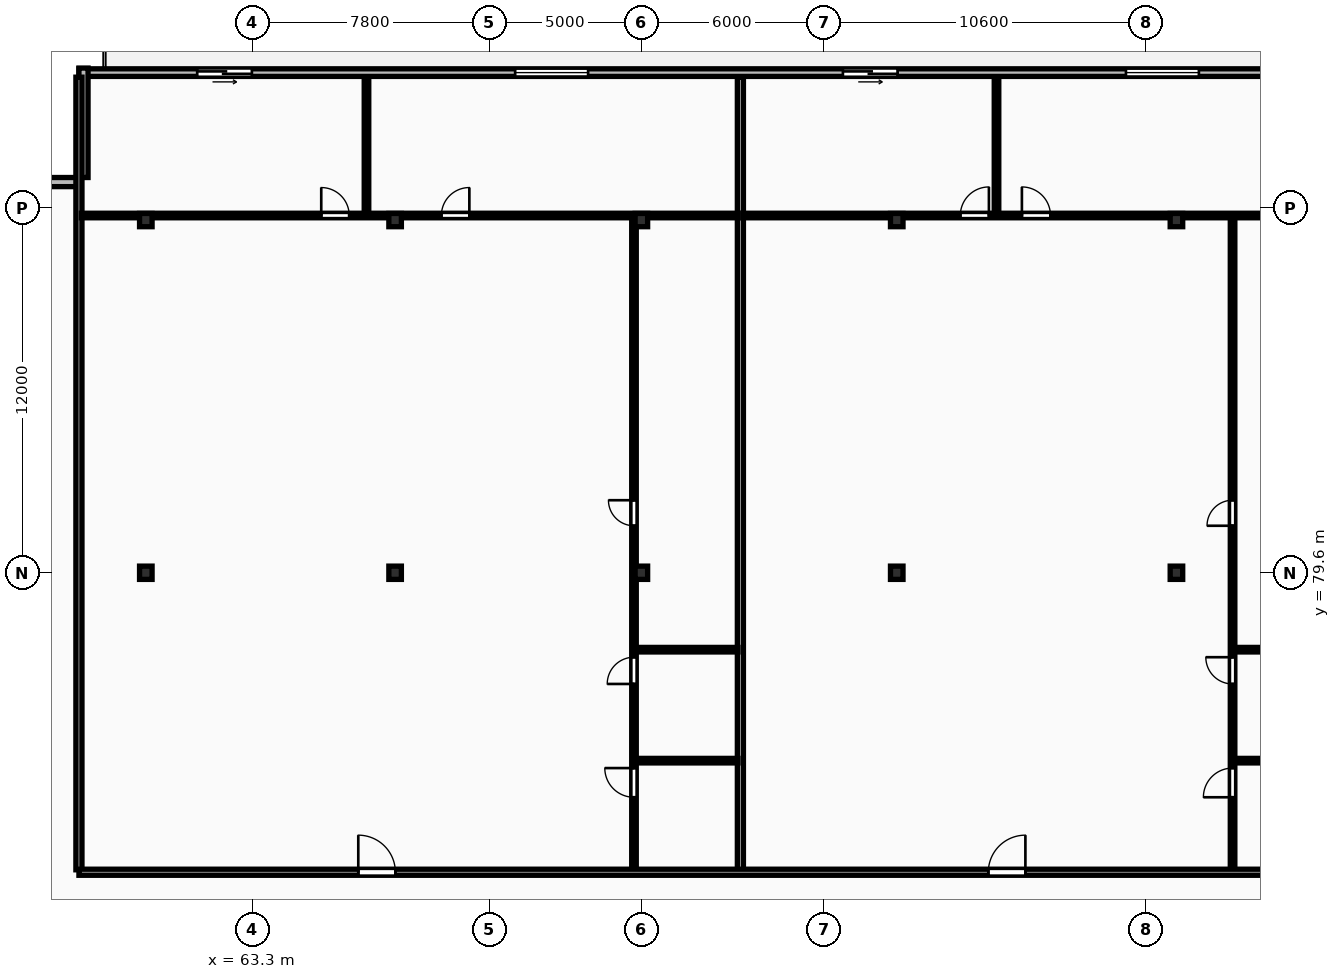
"""IFC4 building model, lengths in metres.
Left out: names, types, materials, properties, quantities, classifications, styles, units other than length and angle.
Written with IfcOpenShell. Run it as: python <this file> out.ifc"""

import sys

from ifc_helpers import new_model, si_unit, direction, frame, frame_2d, origin, origin_2d, place, context, subcontext, project, spatial, rectangle, i_section, extrude, element, fill, save


model = new_model("IFC4")
c1 = context("Model", 3, precision=1e-05, world=origin(), true_north=direction((0.0, 1.0)))
c2 = subcontext(c1, "Body", "Model", "MODEL_VIEW")
j1 = project(units=[si_unit("LENGTHUNIT", "METRE"), si_unit("PLANEANGLEUNIT", "RADIAN")], contexts=[c1])
p1 = place(None, origin())
s1 = spatial("IfcSite", under=j1, at=p1, CompositionType="ELEMENT")
p2 = place(p1, origin())
s2 = spatial("IfcBuilding", under=s1, at=p2, CompositionType="ELEMENT")
p3 = place(p2, frame((0.0, 0.0, 150.1)))
s3 = spatial("IfcBuildingStorey", under=s2, at=p3, CompositionType="ELEMENT", Elevation=150.1)
for number, where, z_axis, x_axis in (
    (1, (59.8, 79.6, 0.0), (0.0, 0.0, 1.0), (1.0, 0.0, 0.0)),
    (2, (59.8, 91.2, 0.0), (0.0, 0.0, 1.0), (1.0, 0.0, 0.0)),
    (3, (68.0, 79.6, 0.0), (0.0, 0.0, 1.0), (1.0, 0.0, 0.0)),
    (4, (68.0, 91.2, 0.0), (0.0, 0.0, 1.0), (1.0, 0.0, 0.0)),
    (5, (76.1, 79.6, 0.0), (0.0, 0.0, 1.0), (1.0, 0.0, 0.0)),
    (6, (76.1, 91.2, 0.0), (0.0, 0.0, 1.0), (1.0, 0.0, 0.0)),
    (7, (84.5, 79.6, 0.0), (0.0, 0.0, 1.0), (1.0, 0.0, 0.0)),
    (8, (84.5, 91.2, 0.0), (0.0, 0.0, 1.0), (1.0, 0.0, 0.0)),
    (9, (93.7, 79.6, 0.0), (0.0, 0.0, 1.0), (1.0, 0.0, 0.0)),
    (10, (93.7, 91.2, 0.0), (0.0, 0.0, 1.0), (1.0, 0.0, 0.0)),
):
    element("IfcColumn", number, at=place(p3, frame(where, z_axis=z_axis, x_axis=x_axis)), inside=s3, PredefinedType="COLUMN", context=c2, shape_type="SweptSolid", body=[
        extrude(i_section(OverallWidth=0.412, OverallDepth=0.437, WebThickness=0.036, FlangeThickness=0.052, FilletRadius=0.015, at=origin_2d()), origin(), (0.0, 0.0, 1.0), 3.6),
    ])
p4 = place(p3, frame((130.6, 96.05, 0.0), z_axis=(0.0, 0.0, 1.0), x_axis=(-1.0, 0.0, 0.0)))
e11 = element("IfcWall", 11, at=p4, inside=s3, PredefinedType="STANDARD", context=c2, shape_type="SweptSolid", body=[
    extrude(rectangle(XDim=73.0, YDim=0.25, at=frame_2d((36.5, 0.0))), origin(), (0.0, 0.0, 1.0), 3.31),
])
p5 = place(p4, frame((67.311, 0.0, 0.0)))
e12 = element("IfcOpeningElement", 12, at=p5, cuts=e11, PredefinedType="OPENING", context=c2, shape_type="SweptSolid", body=[
    extrude(rectangle(XDim=1.8, YDim=2.2, at=frame_2d((0.9, 1.1))), frame((0.0, 0.135, 0.0), z_axis=(0.0, -1.0, 0.0), x_axis=(1.0, 0.0, 0.0)), (0.0, 0.0, 1.0), 0.27),
])
p6 = place(p4, frame((56.252, 0.0, 0.85)))
e13 = element("IfcOpeningElement", 13, at=p6, cuts=e11, PredefinedType="OPENING", context=c2, shape_type="SweptSolid", body=[
    extrude(rectangle(XDim=2.4, YDim=1.9, at=frame_2d((1.2, 0.95))), frame((0.0, 0.135, 0.0), z_axis=(0.0, -1.0, 0.0), x_axis=(1.0, 0.0, 0.0)), (0.0, 0.0, 1.0), 0.27),
])
p7 = place(p4, frame((46.071, 0.0, 0.0)))
e14 = element("IfcOpeningElement", 14, at=p7, cuts=e11, PredefinedType="OPENING", context=c2, shape_type="SweptSolid", body=[
    extrude(rectangle(XDim=1.8, YDim=2.2, at=frame_2d((0.9, 1.1))), frame((0.0, 0.135, 0.0), z_axis=(0.0, -1.0, 0.0), x_axis=(1.0, 0.0, 0.0)), (0.0, 0.0, 1.0), 0.27),
])
p8 = place(p4, frame((36.161, 0.0, 0.85)))
e15 = element("IfcOpeningElement", 15, at=p8, cuts=e11, PredefinedType="OPENING", context=c2, shape_type="SweptSolid", body=[
    extrude(rectangle(XDim=2.4, YDim=1.9, at=frame_2d((1.2, 0.95))), frame((0.0, 0.135, 0.0), z_axis=(0.0, -1.0, 0.0), x_axis=(1.0, 0.0, 0.0)), (0.0, 0.0, 1.0), 0.27),
])
p9 = place(p4, frame((26.569, 0.0, 0.0)))
e16 = element("IfcOpeningElement", 16, at=p9, cuts=e11, PredefinedType="OPENING", context=c2, shape_type="SweptSolid", body=[
    extrude(rectangle(XDim=1.8, YDim=2.2, at=frame_2d((0.9, 1.1))), frame((0.0, 0.135, 0.0), z_axis=(0.0, -1.0, 0.0), x_axis=(1.0, 0.0, 0.0)), (0.0, 0.0, 1.0), 0.27),
])
p10 = place(p4, frame((16.458, 0.0, 0.85)))
e17 = element("IfcOpeningElement", 17, at=p10, cuts=e11, PredefinedType="OPENING", context=c2, shape_type="SweptSolid", body=[
    extrude(rectangle(XDim=2.4, YDim=1.9, at=frame_2d((1.2, 0.95))), frame((0.0, 0.135, 0.0), z_axis=(0.0, -1.0, 0.0), x_axis=(1.0, 0.0, 0.0)), (0.0, 0.0, 1.0), 0.27),
])
p11 = place(p4, frame((7.042, 0.0, 0.0)))
e18 = element("IfcOpeningElement", 18, at=p11, cuts=e11, PredefinedType="OPENING", context=c2, shape_type="SweptSolid", body=[
    extrude(rectangle(XDim=1.8, YDim=2.2, at=frame_2d((0.9, 1.1))), frame((0.0, 0.135, 0.0), z_axis=(0.0, -1.0, 0.0), x_axis=(1.0, 0.0, 0.0)), (0.0, 0.0, 1.0), 0.27),
])
p12 = place(p4, frame((0.9, 0.0, 0.85)))
e19 = element("IfcOpeningElement", 19, at=p12, cuts=e11, PredefinedType="OPENING", context=c2, shape_type="SweptSolid", body=[
    extrude(rectangle(XDim=2.4, YDim=1.9, at=frame_2d((1.2, 0.95))), frame((0.0, 0.135, 0.0), z_axis=(0.0, -1.0, 0.0), x_axis=(1.0, 0.0, 0.0)), (0.0, 0.0, 1.0), 0.27),
])
p13 = place(p3, frame((57.75, 96.2, 0.0), z_axis=(0.0, 0.0, 1.0), x_axis=(0.0, -1.0, 0.0)))
e20 = element("IfcWall", 20, at=p13, inside=s3, PredefinedType="STANDARD", context=c2, shape_type="SweptSolid", body=[
    extrude(rectangle(XDim=3.6, YDim=0.3, at=frame_2d((1.8, 0.0))), origin(), (0.0, 0.0, 1.0), 3.31),
])
p14 = place(p3, frame((57.6, 92.45, 0.0), z_axis=(0.0, 0.0, 1.0), x_axis=(-1.0, 0.0, 0.0)))
e21 = element("IfcWall", 21, at=p14, inside=s3, PredefinedType="STANDARD", context=c2, shape_type="SweptSolid", body=[
    extrude(rectangle(XDim=3.6, YDim=0.3, at=frame_2d((1.8, 0.0))), origin(), (0.0, 0.0, 1.0), 3.31),
])
for number, where, z_axis, x_axis in (
    (22, (57.6, 69.83, 0.0), (0.0, 0.0, 1.0), (0.0, 1.0, 0.0)),
    (23, (79.357, 69.83, 0.0), (0.0, 0.0, 1.0), (0.0, 1.0, 0.0)),
):
    element("IfcWall", number, at=place(p3, frame(where, z_axis=z_axis, x_axis=x_axis)), inside=s3, PredefinedType="PARTITIONING", context=c2, shape_type="SweptSolid", body=[
        extrude(rectangle(XDim=26.07, YDim=0.2, at=frame_2d((13.035, 0.0))), origin(), (0.0, 0.0, 1.0), 3.31),
    ])
for number, where, z_axis, x_axis in (
    (24, (75.917, 73.42, 0.0), (0.0, 0.0, 1.0), (1.0, 0.0, 0.0)),
    (25, (75.917, 77.07, 0.0), (0.0, 0.0, 1.0), (1.0, 0.0, 0.0)),
):
    element("IfcWall", number, at=place(p3, frame(where, z_axis=z_axis, x_axis=x_axis)), inside=s3, PredefinedType="PARTITIONING", context=c2, shape_type="SweptSolid", body=[
        extrude(rectangle(XDim=3.36, YDim=0.15, at=frame_2d((1.68, 0.0))), origin(), (0.0, 0.0, 1.0), 3.31),
    ])
p15 = place(p3, frame((75.857, 69.81, 0.0), z_axis=(0.0, 0.0, 1.0), x_axis=(0.0, 1.0, 0.0)))
e26 = element("IfcWall", 26, at=p15, inside=s3, PredefinedType="PARTITIONING", context=c2, shape_type="SweptSolid", body=[
    extrude(rectangle(XDim=21.48, YDim=0.15, at=frame_2d((10.74, 0.0))), origin(), (0.0, 0.0, 1.0), 2.617),
])
p16 = place(p15, frame((2.406, 0.0, 0.0)))
e27 = element("IfcOpeningElement", 27, at=p16, cuts=e26, PredefinedType="OPENING", context=c2, shape_type="SweptSolid", body=[
    extrude(rectangle(XDim=0.96, YDim=2.1, at=frame_2d((0.48, 1.05))), frame((0.0, 0.085, 0.0), z_axis=(0.0, -1.0, 0.0), x_axis=(1.0, 0.0, 0.0)), (0.0, 0.0, 1.0), 0.17),
])
p17 = place(p15, frame((6.133, 0.0, 0.0)))
e28 = element("IfcOpeningElement", 28, at=p17, cuts=e26, PredefinedType="OPENING", context=c2, shape_type="SweptSolid", body=[
    extrude(rectangle(XDim=0.88, YDim=2.06, at=frame_2d((0.44, 1.03))), frame((0.0, 0.085, 0.0), z_axis=(0.0, -1.0, 0.0), x_axis=(1.0, 0.0, 0.0)), (0.0, 0.0, 1.0), 0.17),
])
p18 = place(p15, frame((11.336, 0.0, 0.0)))
e29 = element("IfcOpeningElement", 29, at=p18, cuts=e26, PredefinedType="OPENING", context=c2, shape_type="SweptSolid", body=[
    extrude(rectangle(XDim=0.84, YDim=2.04, at=frame_2d((0.42, 1.02))), frame((0.0, 0.085, 0.0), z_axis=(0.0, -1.0, 0.0), x_axis=(1.0, 0.0, 0.0)), (0.0, 0.0, 1.0), 0.17),
])
p19 = place(p3, frame((67.059, 91.43, 0.0), z_axis=(0.0, 0.0, 1.0), x_axis=(0.0, 1.0, 0.0)))
e30 = element("IfcWall", 30, at=p19, inside=s3, PredefinedType="PARTITIONING", context=c2, shape_type="SweptSolid", body=[
    extrude(rectangle(XDim=4.47, YDim=0.15, at=frame_2d((2.235, 0.0))), origin(), (0.0, 0.0, 1.0), 3.31),
])
p20 = place(p3, frame((57.68, 91.35, 0.0), z_axis=(0.0, 0.0, 1.0), x_axis=(1.0, 0.0, 0.0)))
e31 = element("IfcWall", 31, at=p20, inside=s3, PredefinedType="PARTITIONING", context=c2, shape_type="SweptSolid", body=[
    extrude(rectangle(XDim=21.597, YDim=0.15, at=frame_2d((10.799, 0.0))), origin(), (0.0, 0.0, 1.0), 3.003),
])
p21 = place(p20, frame((7.89, 0.0, 0.0)))
e32 = element("IfcOpeningElement", 32, at=p21, cuts=e31, PredefinedType="OPENING", context=c2, shape_type="SweptSolid", body=[
    extrude(rectangle(XDim=0.92, YDim=2.08, at=frame_2d((0.46, 1.04))), frame((0.0, 0.085, 0.0), z_axis=(0.0, -1.0, 0.0), x_axis=(1.0, 0.0, 0.0)), (0.0, 0.0, 1.0), 0.17),
])
p22 = place(p20, frame((11.842, 0.0, 0.0)))
e33 = element("IfcOpeningElement", 33, at=p22, cuts=e31, PredefinedType="OPENING", context=c2, shape_type="SweptSolid", body=[
    extrude(rectangle(XDim=0.92, YDim=2.08, at=frame_2d((0.46, 1.04))), frame((0.0, 0.085, 0.0), z_axis=(0.0, -1.0, 0.0), x_axis=(1.0, 0.0, 0.0)), (0.0, 0.0, 1.0), 0.17),
])
for number, where, z_axis, x_axis in (
    (34, (95.606, 73.42, 0.0), (0.0, 0.0, 1.0), (1.0, 0.0, 0.0)),
    (35, (95.606, 77.07, 0.0), (0.0, 0.0, 1.0), (1.0, 0.0, 0.0)),
):
    element("IfcWall", number, at=place(p3, frame(where, z_axis=z_axis, x_axis=x_axis)), inside=s3, PredefinedType="PARTITIONING", context=c2, shape_type="SweptSolid", body=[
        extrude(rectangle(XDim=3.13, YDim=0.15, at=frame_2d((1.565, 0.0))), origin(), (0.0, 0.0, 1.0), 3.31),
    ])
p23 = place(p3, frame((95.546, 69.81, 0.0), z_axis=(0.0, 0.0, 1.0), x_axis=(0.0, 1.0, 0.0)))
e36 = element("IfcWall", 36, at=p23, inside=s3, PredefinedType="PARTITIONING", context=c2, shape_type="SweptSolid", body=[
    extrude(rectangle(XDim=21.48, YDim=0.15, at=frame_2d((10.74, 0.0))), origin(), (0.0, 0.0, 1.0), 3.31),
])
p24 = place(p23, frame((2.406, 0.0, 0.0)))
e37 = element("IfcOpeningElement", 37, at=p24, cuts=e36, PredefinedType="OPENING", context=c2, shape_type="SweptSolid", body=[
    extrude(rectangle(XDim=0.96, YDim=2.1, at=frame_2d((0.48, 1.05))), frame((0.0, 0.085, 0.0), z_axis=(0.0, -1.0, 0.0), x_axis=(1.0, 0.0, 0.0)), (0.0, 0.0, 1.0), 0.17),
])
p25 = place(p23, frame((6.133, 0.0, 0.0)))
e38 = element("IfcOpeningElement", 38, at=p25, cuts=e36, PredefinedType="OPENING", context=c2, shape_type="SweptSolid", body=[
    extrude(rectangle(XDim=0.88, YDim=2.06, at=frame_2d((0.44, 1.03))), frame((0.0, 0.085, 0.0), z_axis=(0.0, -1.0, 0.0), x_axis=(1.0, 0.0, 0.0)), (0.0, 0.0, 1.0), 0.17),
])
p26 = place(p23, frame((11.336, 0.0, 0.0)))
e39 = element("IfcOpeningElement", 39, at=p26, cuts=e36, PredefinedType="OPENING", context=c2, shape_type="SweptSolid", body=[
    extrude(rectangle(XDim=0.84, YDim=2.04, at=frame_2d((0.42, 1.02))), frame((0.0, 0.085, 0.0), z_axis=(0.0, -1.0, 0.0), x_axis=(1.0, 0.0, 0.0)), (0.0, 0.0, 1.0), 0.17),
])
p27 = place(p3, frame((87.781, 91.43, 0.0), z_axis=(0.0, 0.0, 1.0), x_axis=(0.0, 1.0, 0.0)))
e40 = element("IfcWall", 40, at=p27, inside=s3, PredefinedType="PARTITIONING", context=c2, shape_type="SweptSolid", body=[
    extrude(rectangle(XDim=4.47, YDim=0.15, at=frame_2d((2.235, 0.0))), origin(), (0.0, 0.0, 1.0), 3.31),
])
p28 = place(p3, frame((79.437, 91.35, 0.0), z_axis=(0.0, 0.0, 1.0), x_axis=(1.0, 0.0, 0.0)))
e41 = element("IfcWall", 41, at=p28, inside=s3, PredefinedType="PARTITIONING", context=c2, shape_type="SweptSolid", body=[
    extrude(rectangle(XDim=19.299, YDim=0.15, at=frame_2d((9.649, 0.0))), origin(), (0.0, 0.0, 1.0), 3.003),
])
p29 = place(p28, frame((7.155, 0.0, 0.0)))
e42 = element("IfcOpeningElement", 42, at=p29, cuts=e41, PredefinedType="OPENING", context=c2, shape_type="SweptSolid", body=[
    extrude(rectangle(XDim=0.94, YDim=2.1, at=frame_2d((0.47, 1.05))), frame((0.0, 0.085, 0.0), z_axis=(0.0, -1.0, 0.0), x_axis=(1.0, 0.0, 0.0)), (0.0, 0.0, 1.0), 0.17),
])
p30 = place(p28, frame((9.179, 0.0, 0.0)))
e43 = element("IfcOpeningElement", 43, at=p30, cuts=e41, PredefinedType="OPENING", context=c2, shape_type="SweptSolid", body=[
    extrude(rectangle(XDim=0.94, YDim=2.1, at=frame_2d((0.47, 1.05))), frame((0.0, 0.085, 0.0), z_axis=(0.0, -1.0, 0.0), x_axis=(1.0, 0.0, 0.0)), (0.0, 0.0, 1.0), 0.17),
])
p31 = place(p3, frame((57.6, 69.75, 0.0), z_axis=(0.0, 0.0, 1.0), x_axis=(1.0, 0.0, 0.0)))
e44 = element("IfcWall", 44, at=p31, inside=s3, PredefinedType="PARTITIONING", context=c2, shape_type="SweptSolid", body=[
    extrude(rectangle(XDim=73.0, YDim=0.2, at=frame_2d((36.5, 0.0))), origin(), (0.0, 0.0, 1.0), 3.31),
])
p32 = place(p31, frame((9.189, 0.0, 0.0)))
e45 = element("IfcOpeningElement", 45, at=p32, cuts=e44, PredefinedType="OPENING", context=c2, shape_type="SweptSolid", body=[
    extrude(rectangle(XDim=1.22, YDim=2.18, at=frame_2d((0.61, 1.09))), frame((0.0, 0.11, 0.0), z_axis=(0.0, -1.0, 0.0), x_axis=(1.0, 0.0, 0.0)), (0.0, 0.0, 1.0), 0.22),
])
p33 = place(p31, frame((29.912, 0.0, 0.0)))
e46 = element("IfcOpeningElement", 46, at=p33, cuts=e44, PredefinedType="OPENING", context=c2, shape_type="SweptSolid", body=[
    extrude(rectangle(XDim=1.22, YDim=2.18, at=frame_2d((0.61, 1.09))), frame((0.0, 0.11, 0.0), z_axis=(0.0, -1.0, 0.0), x_axis=(1.0, 0.0, 0.0)), (0.0, 0.0, 1.0), 0.22),
])
p34 = place(p31, frame((49.457, 0.0, 0.0)))
e47 = element("IfcOpeningElement", 47, at=p34, cuts=e44, PredefinedType="OPENING", context=c2, shape_type="SweptSolid", body=[
    extrude(rectangle(XDim=1.22, YDim=2.18, at=frame_2d((0.61, 1.09))), frame((0.0, 0.11, 0.0), z_axis=(0.0, -1.0, 0.0), x_axis=(1.0, 0.0, 0.0)), (0.0, 0.0, 1.0), 0.22),
])
p35 = place(p31, frame((63.122, 0.0, 0.0)))
e48 = element("IfcOpeningElement", 48, at=p35, cuts=e44, PredefinedType="OPENING", context=c2, shape_type="SweptSolid", body=[
    extrude(rectangle(XDim=0.95, YDim=2.15, at=frame_2d((0.475, 1.075))), frame((0.0, 0.11, 0.0), z_axis=(0.0, -1.0, 0.0), x_axis=(1.0, 0.0, 0.0)), (0.0, 0.0, 1.0), 0.22),
])
p36 = place(p5, origin())
e49 = element("IfcDoor", 49, at=p36, inside=s3, OperationType="SLIDING_TO_LEFT", PredefinedType="DOOR", context=c2, shape_type="SweptSolid", body=[
    extrude(rectangle(XDim=1.8, YDim=2.2, at=frame_2d((0.9, 1.1))), frame((0.0, 0.025, 0.0), z_axis=(0.0, -1.0, 0.0), x_axis=(1.0, 0.0, 0.0)), (0.0, 0.0, 1.0), 0.05),
])
fill(e12, e49)
p37 = place(p6, origin())
e50 = element("IfcWindow", 50, at=p37, inside=s3, PartitioningType="DOUBLE_PANEL_VERTICAL", PredefinedType="WINDOW", context=c2, shape_type="SweptSolid", body=[
    extrude(rectangle(XDim=2.4, YDim=1.9, at=frame_2d((1.2, 0.95))), frame((0.0, 0.03, 0.0), z_axis=(0.0, -1.0, 0.0), x_axis=(1.0, 0.0, 0.0)), (0.0, 0.0, 1.0), 0.06),
])
fill(e13, e50)
p38 = place(p7, origin())
e51 = element("IfcDoor", 51, at=p38, inside=s3, OperationType="SLIDING_TO_LEFT", PredefinedType="DOOR", context=c2, shape_type="SweptSolid", body=[
    extrude(rectangle(XDim=1.8, YDim=2.2, at=frame_2d((0.9, 1.1))), frame((0.0, 0.025, 0.0), z_axis=(0.0, -1.0, 0.0), x_axis=(1.0, 0.0, 0.0)), (0.0, 0.0, 1.0), 0.05),
])
fill(e14, e51)
p39 = place(p8, origin())
e52 = element("IfcWindow", 52, at=p39, inside=s3, PartitioningType="DOUBLE_PANEL_VERTICAL", PredefinedType="WINDOW", context=c2, shape_type="SweptSolid", body=[
    extrude(rectangle(XDim=2.4, YDim=1.9, at=frame_2d((1.2, 0.95))), frame((0.0, 0.03, 0.0), z_axis=(0.0, -1.0, 0.0), x_axis=(1.0, 0.0, 0.0)), (0.0, 0.0, 1.0), 0.06),
])
fill(e15, e52)
p40 = place(p16, origin())
e53 = element("IfcDoor", 53, at=p40, inside=s3, OperationType="SINGLE_SWING_RIGHT", PredefinedType="DOOR", context=c2, shape_type="SweptSolid", body=[
    extrude(rectangle(XDim=0.96, YDim=2.1, at=frame_2d((0.48, 1.05))), frame((0.0, 0.025, 0.0), z_axis=(0.0, -1.0, 0.0), x_axis=(1.0, 0.0, 0.0)), (0.0, 0.0, 1.0), 0.05),
])
fill(e27, e53)
p41 = place(p17, origin())
e54 = element("IfcDoor", 54, at=p41, inside=s3, OperationType="SINGLE_SWING_LEFT", PredefinedType="DOOR", context=c2, shape_type="SweptSolid", body=[
    extrude(rectangle(XDim=0.88, YDim=2.06, at=frame_2d((0.44, 1.03))), frame((0.0, 0.025, 0.0), z_axis=(0.0, -1.0, 0.0), x_axis=(1.0, 0.0, 0.0)), (0.0, 0.0, 1.0), 0.05),
])
fill(e28, e54)
p42 = place(p18, origin())
e55 = element("IfcDoor", 55, at=p42, inside=s3, OperationType="SINGLE_SWING_RIGHT", PredefinedType="DOOR", context=c2, shape_type="SweptSolid", body=[
    extrude(rectangle(XDim=0.84, YDim=2.04, at=frame_2d((0.42, 1.02))), frame((0.0, 0.025, 0.0), z_axis=(0.0, -1.0, 0.0), x_axis=(1.0, 0.0, 0.0)), (0.0, 0.0, 1.0), 0.05),
])
fill(e29, e55)
p43 = place(p21, origin())
e56 = element("IfcDoor", 56, at=p43, inside=s3, OperationType="SINGLE_SWING_LEFT", PredefinedType="DOOR", context=c2, shape_type="SweptSolid", body=[
    extrude(rectangle(XDim=0.92, YDim=2.08, at=frame_2d((0.46, 1.04))), frame((0.0, 0.025, 0.0), z_axis=(0.0, -1.0, 0.0), x_axis=(1.0, 0.0, 0.0)), (0.0, 0.0, 1.0), 0.05),
])
fill(e32, e56)
p44 = place(p22, origin())
e57 = element("IfcDoor", 57, at=p44, inside=s3, OperationType="SINGLE_SWING_RIGHT", PredefinedType="DOOR", context=c2, shape_type="SweptSolid", body=[
    extrude(rectangle(XDim=0.92, YDim=2.08, at=frame_2d((0.46, 1.04))), frame((0.0, 0.025, 0.0), z_axis=(0.0, -1.0, 0.0), x_axis=(1.0, 0.0, 0.0)), (0.0, 0.0, 1.0), 0.05),
])
fill(e33, e57)
p45 = place(p24, origin())
e58 = element("IfcDoor", 58, at=p45, inside=s3, OperationType="SINGLE_SWING_LEFT", PredefinedType="DOOR", context=c2, shape_type="SweptSolid", body=[
    extrude(rectangle(XDim=0.96, YDim=2.1, at=frame_2d((0.48, 1.05))), frame((0.0, 0.025, 0.0), z_axis=(0.0, -1.0, 0.0), x_axis=(1.0, 0.0, 0.0)), (0.0, 0.0, 1.0), 0.05),
])
fill(e37, e58)
p46 = place(p25, origin())
e59 = element("IfcDoor", 59, at=p46, inside=s3, OperationType="SINGLE_SWING_RIGHT", PredefinedType="DOOR", context=c2, shape_type="SweptSolid", body=[
    extrude(rectangle(XDim=0.88, YDim=2.06, at=frame_2d((0.44, 1.03))), frame((0.0, 0.025, 0.0), z_axis=(0.0, -1.0, 0.0), x_axis=(1.0, 0.0, 0.0)), (0.0, 0.0, 1.0), 0.05),
])
fill(e38, e59)
p47 = place(p26, origin())
e60 = element("IfcDoor", 60, at=p47, inside=s3, OperationType="SINGLE_SWING_LEFT", PredefinedType="DOOR", context=c2, shape_type="SweptSolid", body=[
    extrude(rectangle(XDim=0.84, YDim=2.04, at=frame_2d((0.42, 1.02))), frame((0.0, 0.025, 0.0), z_axis=(0.0, -1.0, 0.0), x_axis=(1.0, 0.0, 0.0)), (0.0, 0.0, 1.0), 0.05),
])
fill(e39, e60)
p48 = place(p29, origin())
e61 = element("IfcDoor", 61, at=p48, inside=s3, OperationType="SINGLE_SWING_RIGHT", PredefinedType="DOOR", context=c2, shape_type="SweptSolid", body=[
    extrude(rectangle(XDim=0.94, YDim=2.1, at=frame_2d((0.47, 1.05))), frame((0.0, 0.025, 0.0), z_axis=(0.0, -1.0, 0.0), x_axis=(1.0, 0.0, 0.0)), (0.0, 0.0, 1.0), 0.05),
])
fill(e42, e61)
p49 = place(p30, origin())
e62 = element("IfcDoor", 62, at=p49, inside=s3, OperationType="SINGLE_SWING_LEFT", PredefinedType="DOOR", context=c2, shape_type="SweptSolid", body=[
    extrude(rectangle(XDim=0.94, YDim=2.1, at=frame_2d((0.47, 1.05))), frame((0.0, 0.025, 0.0), z_axis=(0.0, -1.0, 0.0), x_axis=(1.0, 0.0, 0.0)), (0.0, 0.0, 1.0), 0.05),
])
fill(e43, e62)
p50 = place(p32, origin())
e63 = element("IfcDoor", 63, at=p50, inside=s3, OperationType="SINGLE_SWING_LEFT", PredefinedType="DOOR", context=c2, shape_type="SweptSolid", body=[
    extrude(rectangle(XDim=1.22, YDim=2.18, at=frame_2d((0.61, 1.09))), frame((0.0, 0.025, 0.0), z_axis=(0.0, -1.0, 0.0), x_axis=(1.0, 0.0, 0.0)), (0.0, 0.0, 1.0), 0.05),
])
fill(e45, e63)
p51 = place(p33, origin())
e64 = element("IfcDoor", 64, at=p51, inside=s3, OperationType="SINGLE_SWING_RIGHT", PredefinedType="DOOR", context=c2, shape_type="SweptSolid", body=[
    extrude(rectangle(XDim=1.22, YDim=2.18, at=frame_2d((0.61, 1.09))), frame((0.0, 0.025, 0.0), z_axis=(0.0, -1.0, 0.0), x_axis=(1.0, 0.0, 0.0)), (0.0, 0.0, 1.0), 0.05),
])
fill(e46, e64)
save(model, sys.argv[1])
